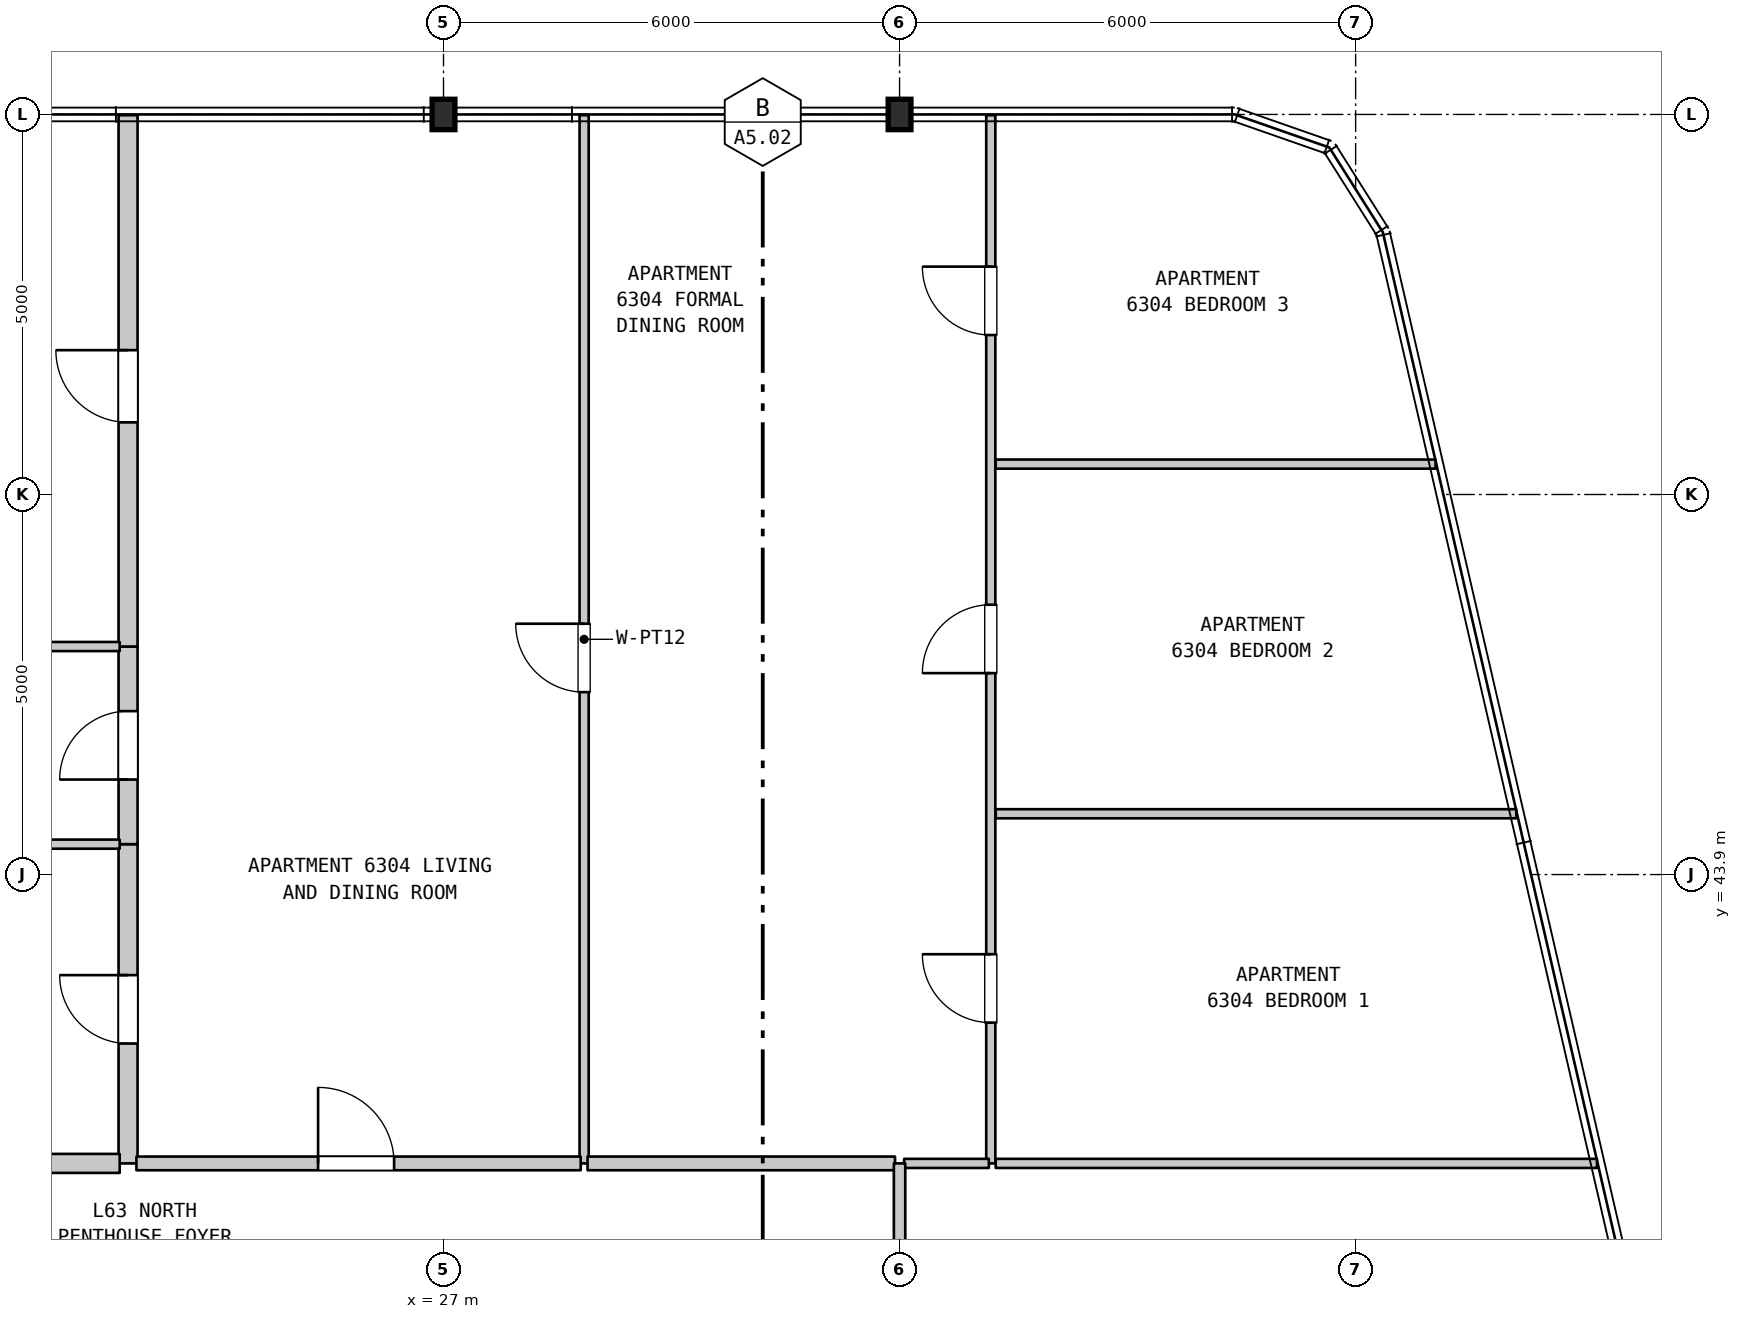
"""IFC4 building model, lengths in metres.
Left out: names, types, materials, properties, quantities, classifications, styles, units other than length and angle.
Written with IfcOpenShell. Run it as: python <this file> out.ifc"""

import sys

from ifc_helpers import new_model, si_unit, direction, frame, frame_2d, origin, origin_2d, place, context, subcontext, project, spatial, rectangle, i_section, extrude, element, fill, save


model = new_model("IFC4")
c1 = context("Model", 3, precision=1e-05, world=origin(), true_north=direction((0.0, 1.0)))
c2 = subcontext(c1, "Body", "Model", "MODEL_VIEW")
j1 = project(units=[si_unit("LENGTHUNIT", "METRE"), si_unit("PLANEANGLEUNIT", "RADIAN")], contexts=[c1])
p1 = place(None, origin())
s1 = spatial("IfcSite", under=j1, at=p1, CompositionType="ELEMENT")
p2 = place(p1, origin())
s2 = spatial("IfcBuilding", under=s1, at=p2, CompositionType="ELEMENT")
p3 = place(p2, frame((0.0, 0.0, 254.7)))
s3 = spatial("IfcBuildingStorey", under=s2, at=p3, CompositionType="ELEMENT", Elevation=254.7)
for number, where, z_axis, x_axis in (
    (1, (27.0, 53.9, 0.0), (0.0, 0.0, 1.0), (1.0, 0.0, 0.0)),
    (2, (33.0, 53.9, 0.0), (0.0, 0.0, 1.0), (1.0, 0.0, 0.0)),
):
    element("IfcColumn", number, at=place(p3, frame(where, z_axis=z_axis, x_axis=x_axis)), inside=s3, PredefinedType="COLUMN", context=c2, shape_type="SweptSolid", body=[
        extrude(i_section(OverallWidth=0.3, OverallDepth=0.4, WebThickness=0.013, FlangeThickness=0.024, FilletRadius=0.027, at=origin_2d()), origin(), (0.0, 0.0, 1.0), 3.7),
    ])
p4 = place(p3, frame((22.85, 40.1, 0.0), z_axis=(0.0, 0.0, 1.0), x_axis=(0.0, 1.0, 0.0)))
e3 = element("IfcWall", 3, at=p4, inside=s3, PredefinedType="STANDARD", context=c2, shape_type="SweptSolid", body=[
    extrude(rectangle(XDim=4.2, YDim=0.25, at=frame_2d((2.1, 0.0))), origin(), (0.0, 0.0, 1.0), 3.39),
])
p5 = place(p4, frame((1.577, 0.0, 0.0)))
e4 = element("IfcOpeningElement", 4, at=p5, cuts=e3, PredefinedType="OPENING", context=c2, shape_type="SweptSolid", body=[
    extrude(rectangle(XDim=0.9, YDim=2.15, at=frame_2d((0.45, 1.075))), frame((0.0, 0.135, 0.0), z_axis=(0.0, -1.0, 0.0), x_axis=(1.0, 0.0, 0.0)), (0.0, 0.0, 1.0), 0.27),
])
p6 = place(p3, frame((22.85, 44.3, 0.0), z_axis=(0.0, 0.0, 1.0), x_axis=(0.0, 1.0, 0.0)))
e5 = element("IfcWall", 5, at=p6, inside=s3, PredefinedType="STANDARD", context=c2, shape_type="SweptSolid", body=[
    extrude(rectangle(XDim=2.6, YDim=0.25, at=frame_2d((1.3, 0.0))), origin(), (0.0, 0.0, 1.0), 3.39),
])
p7 = place(p6, frame((0.85, 0.0, 0.0)))
e6 = element("IfcOpeningElement", 6, at=p7, cuts=e5, PredefinedType="OPENING", context=c2, shape_type="SweptSolid", body=[
    extrude(rectangle(XDim=0.9, YDim=2.1, at=frame_2d((0.45, 1.05))), frame((0.0, 0.135, 0.0), z_axis=(0.0, -1.0, 0.0), x_axis=(1.0, 0.0, 0.0)), (0.0, 0.0, 1.0), 0.27),
])
p8 = place(p3, frame((22.85, 46.9, 0.0), z_axis=(0.0, 0.0, 1.0), x_axis=(0.0, 1.0, 0.0)))
e7 = element("IfcWall", 7, at=p8, inside=s3, PredefinedType="STANDARD", context=c2, shape_type="SweptSolid", body=[
    extrude(rectangle(XDim=6.99, YDim=0.25, at=frame_2d((3.495, 0.0))), origin(), (0.0, 0.0, 1.0), 3.39),
])
p9 = place(p8, frame((2.949, 0.0, 0.0)))
e8 = element("IfcOpeningElement", 8, at=p9, cuts=e7, PredefinedType="OPENING", context=c2, shape_type="SweptSolid", body=[
    extrude(rectangle(XDim=0.95, YDim=2.15, at=frame_2d((0.475, 1.075))), frame((0.0, 0.135, 0.0), z_axis=(0.0, -1.0, 0.0), x_axis=(1.0, 0.0, 0.0)), (0.0, 0.0, 1.0), 0.27),
])
p10 = place(p3, frame((28.85, 40.1, 0.0), z_axis=(0.0, 0.0, 1.0), x_axis=(0.0, 1.0, 0.0)))
e9 = element("IfcWall", 9, at=p10, inside=s3, PredefinedType="PARTITIONING", context=c2, shape_type="SweptSolid", body=[
    extrude(rectangle(XDim=13.79, YDim=0.12, at=frame_2d((6.895, 0.0))), origin(), (0.0, 0.0, 1.0), 3.39),
])
p11 = place(p10, frame((6.2, 0.0, 0.0)))
e10 = element("IfcOpeningElement", 10, at=p11, cuts=e9, PredefinedType="OPENING", context=c2, shape_type="SweptSolid", body=[
    extrude(rectangle(XDim=0.9, YDim=2.15, at=frame_2d((0.45, 1.075))), frame((0.0, 0.07, 0.0), z_axis=(0.0, -1.0, 0.0), x_axis=(1.0, 0.0, 0.0)), (0.0, 0.0, 1.0), 0.14),
])
p12 = place(p3, frame((34.2, 40.1, 0.0), z_axis=(0.0, 0.0, 1.0), x_axis=(0.0, 1.0, 0.0)))
e11 = element("IfcWall", 11, at=p12, inside=s3, PredefinedType="PARTITIONING", context=c2, shape_type="SweptSolid", body=[
    extrude(rectangle(XDim=13.79, YDim=0.12, at=frame_2d((6.895, 0.0))), origin(), (0.0, 0.0, 1.0), 3.39),
])
p13 = place(p12, frame((1.852, 0.0, 0.0)))
e12 = element("IfcOpeningElement", 12, at=p13, cuts=e11, PredefinedType="OPENING", context=c2, shape_type="SweptSolid", body=[
    extrude(rectangle(XDim=0.9, YDim=2.15, at=frame_2d((0.45, 1.075))), frame((0.0, 0.07, 0.0), z_axis=(0.0, -1.0, 0.0), x_axis=(1.0, 0.0, 0.0)), (0.0, 0.0, 1.0), 0.14),
])
p14 = place(p12, frame((6.45, 0.0, 0.0)))
e13 = element("IfcOpeningElement", 13, at=p14, cuts=e11, PredefinedType="OPENING", context=c2, shape_type="SweptSolid", body=[
    extrude(rectangle(XDim=0.9, YDim=2.15, at=frame_2d((0.45, 1.075))), frame((0.0, 0.07, 0.0), z_axis=(0.0, -1.0, 0.0), x_axis=(1.0, 0.0, 0.0)), (0.0, 0.0, 1.0), 0.14),
])
p15 = place(p12, frame((10.898, 0.0, 0.0)))
e14 = element("IfcOpeningElement", 14, at=p15, cuts=e11, PredefinedType="OPENING", context=c2, shape_type="SweptSolid", body=[
    extrude(rectangle(XDim=0.9, YDim=2.15, at=frame_2d((0.45, 1.075))), frame((0.0, 0.07, 0.0), z_axis=(0.0, -1.0, 0.0), x_axis=(1.0, 0.0, 0.0)), (0.0, 0.0, 1.0), 0.14),
])
p16 = place(p3, frame((14.545, 40.1, 0.0), z_axis=(0.0, 0.0, 1.0), x_axis=(1.0, 0.0, 0.0)))
e15 = element("IfcWall", 15, at=p16, inside=s3, PredefinedType="STANDARD", context=c2, shape_type="SweptSolid", body=[
    extrude(rectangle(XDim=8.195, YDim=0.25, at=frame_2d((4.098, 0.0))), origin(), (0.0, 0.0, 1.0), 3.39),
])
p17 = place(p3, frame((22.96, 40.1, 0.0), z_axis=(0.0, 0.0, 1.0), x_axis=(1.0, 0.0, 0.0)))
e16 = element("IfcWall", 16, at=p17, inside=s3, PredefinedType="STANDARD", context=c2, shape_type="SweptSolid", body=[
    extrude(rectangle(XDim=5.845, YDim=0.18, at=frame_2d((2.922, 0.0))), origin(), (0.0, 0.0, 1.0), 3.39),
])
p18 = place(p17, frame((2.39, 0.0, 0.0)))
e17 = element("IfcOpeningElement", 17, at=p18, cuts=e16, PredefinedType="OPENING", context=c2, shape_type="SweptSolid", body=[
    extrude(rectangle(XDim=1.0, YDim=2.15, at=frame_2d((0.5, 1.075))), frame((0.0, 0.1, 0.0), z_axis=(0.0, -1.0, 0.0), x_axis=(1.0, 0.0, 0.0)), (0.0, 0.0, 1.0), 0.2),
])
p19 = place(p3, frame((28.895, 40.1, 0.0), z_axis=(0.0, 0.0, 1.0), x_axis=(1.0, 0.0, 0.0)))
e18 = element("IfcWall", 18, at=p19, inside=s3, PredefinedType="STANDARD", context=c2, shape_type="SweptSolid", body=[
    extrude(rectangle(XDim=4.045, YDim=0.18, at=frame_2d((2.022, 0.0))), origin(), (0.0, 0.0, 1.0), 3.39),
])
p20 = place(p3, frame((33.06, 40.1, 0.0), z_axis=(0.0, 0.0, 1.0), x_axis=(1.0, 0.0, 0.0)))
e19 = element("IfcWall", 19, at=p20, inside=s3, PredefinedType="PARTITIONING", context=c2, shape_type="SweptSolid", body=[
    extrude(rectangle(XDim=1.115, YDim=0.12, at=frame_2d((0.558, 0.0))), origin(), (0.0, 0.0, 1.0), 3.39),
])
p21 = place(p3, frame((34.265, 40.1, 0.0), z_axis=(0.0, 0.0, 1.0), x_axis=(1.0, 0.0, 0.0)))
e20 = element("IfcWall", 20, at=p21, inside=s3, PredefinedType="PARTITIONING", context=c2, shape_type="SweptSolid", body=[
    extrude(rectangle(XDim=7.91, YDim=0.12, at=frame_2d((3.955, 0.0))), origin(), (0.0, 0.0, 1.0), 3.39),
])
p22 = place(p3, frame((14.545, 44.3, 0.0), z_axis=(0.0, 0.0, 1.0), x_axis=(1.0, 0.0, 0.0)))
e21 = element("IfcWall", 21, at=p22, inside=s3, PredefinedType="PARTITIONING", context=c2, shape_type="SweptSolid", body=[
    extrude(rectangle(XDim=8.195, YDim=0.12, at=frame_2d((4.098, 0.0))), origin(), (0.0, 0.0, 1.0), 3.39),
])
p23 = place(p3, frame((34.265, 44.7, 0.0), z_axis=(0.0, 0.0, 1.0), x_axis=(1.0, 0.0, 0.0)))
e22 = element("IfcWall", 22, at=p23, inside=s3, PredefinedType="PARTITIONING", context=c2, shape_type="SweptSolid", body=[
    extrude(rectangle(XDim=6.848, YDim=0.12, at=frame_2d((3.424, 0.0))), origin(), (0.0, 0.0, 1.0), 3.39),
])
p24 = place(p3, frame((14.545, 46.9, 0.0), z_axis=(0.0, 0.0, 1.0), x_axis=(1.0, 0.0, 0.0)))
e23 = element("IfcWall", 23, at=p24, inside=s3, PredefinedType="PARTITIONING", context=c2, shape_type="SweptSolid", body=[
    extrude(rectangle(XDim=8.195, YDim=0.12, at=frame_2d((4.098, 0.0))), origin(), (0.0, 0.0, 1.0), 3.39),
])
p25 = place(p3, frame((34.265, 49.3, 0.0), z_axis=(0.0, 0.0, 1.0), x_axis=(1.0, 0.0, 0.0)))
e24 = element("IfcWall", 24, at=p25, inside=s3, PredefinedType="PARTITIONING", context=c2, shape_type="SweptSolid", body=[
    extrude(rectangle(XDim=5.787, YDim=0.12, at=frame_2d((2.894, 0.0))), origin(), (0.0, 0.0, 1.0), 3.39),
])
p26 = place(p3, frame((33.0, 37.9, 0.0), z_axis=(0.0, 0.0, 1.0), x_axis=(0.0, 1.0, 0.0)))
e25 = element("IfcWall", 25, at=p26, inside=s3, PredefinedType="STANDARD", context=c2, shape_type="SweptSolid", body=[
    extrude(rectangle(XDim=2.2, YDim=0.15, at=frame_2d((1.1, 0.0))), origin(), (0.0, 0.0, 1.0), 2.79),
])
p27 = place(p5, origin())
e26 = element("IfcDoor", 26, at=p27, inside=s3, OperationType="SINGLE_SWING_RIGHT", PredefinedType="DOOR", context=c2, shape_type="SweptSolid", body=[
    extrude(rectangle(XDim=0.9, YDim=2.15, at=frame_2d((0.45, 1.075))), frame((0.0, 0.025, 0.0), z_axis=(0.0, -1.0, 0.0), x_axis=(1.0, 0.0, 0.0)), (0.0, 0.0, 1.0), 0.05),
])
fill(e4, e26)
p28 = place(p7, origin())
e27 = element("IfcDoor", 27, at=p28, inside=s3, OperationType="SINGLE_SWING_LEFT", PredefinedType="DOOR", context=c2, shape_type="SweptSolid", body=[
    extrude(rectangle(XDim=0.9, YDim=2.1, at=frame_2d((0.45, 1.05))), frame((0.0, 0.025, 0.0), z_axis=(0.0, -1.0, 0.0), x_axis=(1.0, 0.0, 0.0)), (0.0, 0.0, 1.0), 0.05),
])
fill(e6, e27)
p29 = place(p9, origin())
e28 = element("IfcDoor", 28, at=p29, inside=s3, OperationType="SINGLE_SWING_RIGHT", PredefinedType="DOOR", context=c2, shape_type="SweptSolid", body=[
    extrude(rectangle(XDim=0.95, YDim=2.15, at=frame_2d((0.475, 1.075))), frame((0.0, 0.025, 0.0), z_axis=(0.0, -1.0, 0.0), x_axis=(1.0, 0.0, 0.0)), (0.0, 0.0, 1.0), 0.05),
])
fill(e8, e28)
p30 = place(p11, origin())
e29 = element("IfcDoor", 29, at=p30, inside=s3, OperationType="SINGLE_SWING_RIGHT", PredefinedType="DOOR", context=c2, shape_type="SweptSolid", body=[
    extrude(rectangle(XDim=0.9, YDim=2.15, at=frame_2d((0.45, 1.075))), frame((0.0, 0.025, 0.0), z_axis=(0.0, -1.0, 0.0), x_axis=(1.0, 0.0, 0.0)), (0.0, 0.0, 1.0), 0.05),
])
fill(e10, e29)
p31 = place(p13, origin())
e30 = element("IfcDoor", 30, at=p31, inside=s3, OperationType="SINGLE_SWING_RIGHT", PredefinedType="DOOR", context=c2, shape_type="SweptSolid", body=[
    extrude(rectangle(XDim=0.9, YDim=2.15, at=frame_2d((0.45, 1.075))), frame((0.0, 0.025, 0.0), z_axis=(0.0, -1.0, 0.0), x_axis=(1.0, 0.0, 0.0)), (0.0, 0.0, 1.0), 0.05),
])
fill(e12, e30)
p32 = place(p14, origin())
e31 = element("IfcDoor", 31, at=p32, inside=s3, OperationType="SINGLE_SWING_LEFT", PredefinedType="DOOR", context=c2, shape_type="SweptSolid", body=[
    extrude(rectangle(XDim=0.9, YDim=2.15, at=frame_2d((0.45, 1.075))), frame((0.0, 0.025, 0.0), z_axis=(0.0, -1.0, 0.0), x_axis=(1.0, 0.0, 0.0)), (0.0, 0.0, 1.0), 0.05),
])
fill(e13, e31)
p33 = place(p15, origin())
e32 = element("IfcDoor", 32, at=p33, inside=s3, OperationType="SINGLE_SWING_RIGHT", PredefinedType="DOOR", context=c2, shape_type="SweptSolid", body=[
    extrude(rectangle(XDim=0.9, YDim=2.15, at=frame_2d((0.45, 1.075))), frame((0.0, 0.025, 0.0), z_axis=(0.0, -1.0, 0.0), x_axis=(1.0, 0.0, 0.0)), (0.0, 0.0, 1.0), 0.05),
])
fill(e14, e32)
p34 = place(p18, origin())
e33 = element("IfcDoor", 33, at=p34, inside=s3, OperationType="SINGLE_SWING_LEFT", PredefinedType="DOOR", context=c2, shape_type="SweptSolid", body=[
    extrude(rectangle(XDim=1.0, YDim=2.15, at=frame_2d((0.5, 1.075))), frame((0.0, 0.025, 0.0), z_axis=(0.0, -1.0, 0.0), x_axis=(1.0, 0.0, 0.0)), (0.0, 0.0, 1.0), 0.05),
])
fill(e17, e33)
save(model, sys.argv[1])
